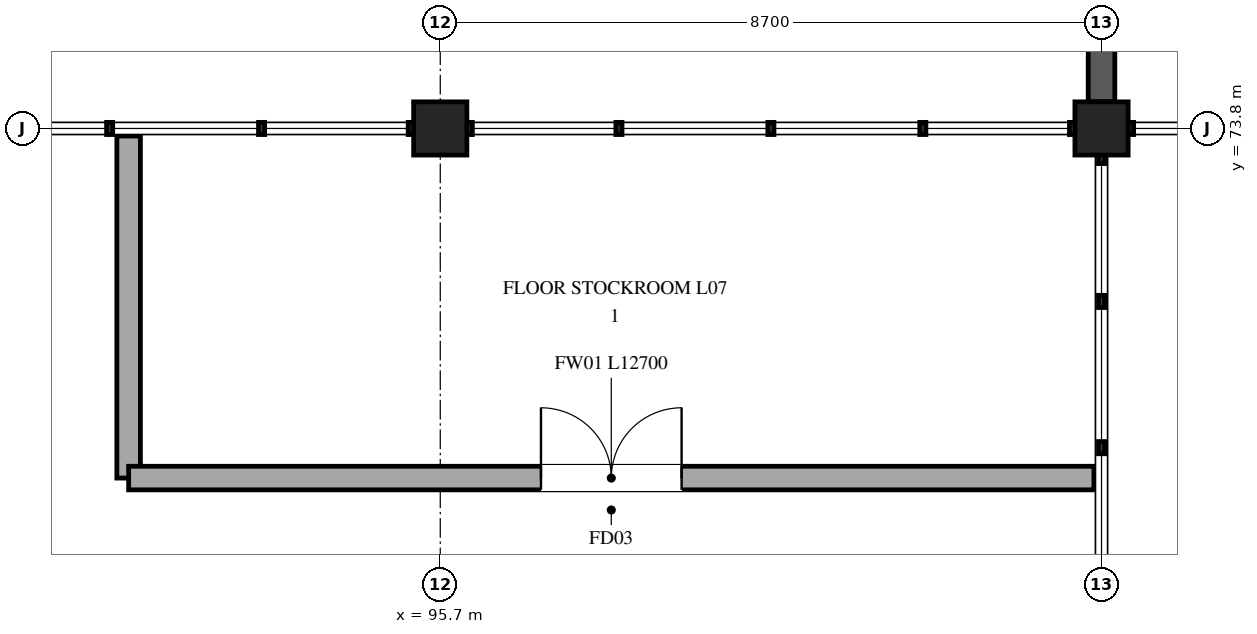
"""IFC4 building model, lengths in metres.
Left out: names, types, materials, properties, quantities, classifications, styles, units other than length and angle.
Written with IfcOpenShell. Run it as: python <this file> out.ifc"""

import sys

from ifc_helpers import new_model, si_unit, direction, frame, frame_2d, origin, origin_2d, place, context, subcontext, project, spatial, rectangle, extrude, element, fill, save


model = new_model("IFC4")
c1 = context("Model", 3, precision=1e-05, world=origin(), true_north=direction((0.0, 1.0)))
c2 = subcontext(c1, "Body", "Model", "MODEL_VIEW")
j1 = project(units=[si_unit("LENGTHUNIT", "METRE"), si_unit("PLANEANGLEUNIT", "RADIAN")], contexts=[c1])
p1 = place(None, origin())
s1 = spatial("IfcSite", under=j1, at=p1, CompositionType="ELEMENT")
p2 = place(p1, origin())
s2 = spatial("IfcBuilding", under=s1, at=p2, CompositionType="ELEMENT")
p3 = place(p2, frame((0.0, 0.0, 31.5)))
s3 = spatial("IfcBuildingStorey", under=s2, at=p3, CompositionType="ELEMENT", Elevation=31.5)
for number, where, z_axis, x_axis in (
    (1, (95.7, 73.8, 0.0), (0.0, 0.0, 1.0), (1.0, 0.0, 0.0)),
    (2, (104.4, 73.8, 0.0), (0.0, 0.0, 1.0), (1.0, 0.0, 0.0)),
):
    element("IfcColumn", number, at=place(p3, frame(where, z_axis=z_axis, x_axis=x_axis)), inside=s3, PredefinedType="COLUMN", context=c2, shape_type="SweptSolid", body=[
        extrude(rectangle(XDim=0.7, YDim=0.7, at=origin_2d()), origin(), (0.0, 0.0, 1.0), 4.8),
    ])
p4 = place(p3, frame((104.4, 74.152, 0.0), z_axis=(0.0, 0.0, 1.0), x_axis=(0.0, 1.0, 0.0)))
e3 = element("IfcWall", 3, at=p4, inside=s3, PredefinedType="STANDARD", context=c2, shape_type="SweptSolid", body=[
    extrude(rectangle(XDim=7.696, YDim=0.35, at=frame_2d((3.848, 0.0))), origin(), (0.0, 0.0, 1.0), 4.49),
])
p5 = place(p4, frame((2.248, 0.0, 0.85)))
e4 = element("IfcOpeningElement", 4, at=p5, cuts=e3, PredefinedType="OPENING", context=c2, shape_type="SweptSolid", body=[
    extrude(rectangle(XDim=3.2, YDim=2.55, at=frame_2d((1.6, 1.275))), frame((0.0, 0.185, 0.0), z_axis=(0.0, -1.0, 0.0), x_axis=(1.0, 0.0, 0.0)), (0.0, 0.0, 1.0), 0.37),
])
p6 = place(p3, frame((91.6, 73.7, 0.0), z_axis=(0.0, 0.0, 1.0), x_axis=(0.0, -1.0, 0.0)))
e5 = element("IfcWall", 5, at=p6, inside=s3, PredefinedType="STANDARD", context=c2, shape_type="SweptSolid", body=[
    extrude(rectangle(XDim=4.5, YDim=0.31, at=frame_2d((2.25, 0.0))), origin(), (0.0, 0.0, 1.0), 3.76),
])
p7 = place(p3, frame((91.6, 69.2, 0.0), z_axis=(0.0, 0.0, 1.0), x_axis=(1.0, 0.0, 0.0)))
e6 = element("IfcWall", 6, at=p7, inside=s3, PredefinedType="STANDARD", context=c2, shape_type="SweptSolid", body=[
    extrude(rectangle(XDim=12.7, YDim=0.31, at=frame_2d((6.35, 0.0))), origin(), (0.0, 0.0, 1.0), 3.76),
])
p8 = place(p7, frame((5.425, 0.0, 0.0)))
e7 = element("IfcOpeningElement", 7, at=p8, cuts=e6, PredefinedType="OPENING", context=c2, shape_type="SweptSolid", body=[
    extrude(rectangle(XDim=1.85, YDim=2.3, at=frame_2d((0.925, 1.15))), frame((0.0, 0.165, 0.0), z_axis=(0.0, -1.0, 0.0), x_axis=(1.0, 0.0, 0.0)), (0.0, 0.0, 1.0), 0.33),
])
p9 = place(p8, origin())
e8 = element("IfcDoor", 8, at=p9, inside=s3, OperationType="DOUBLE_DOOR_SINGLE_SWING", PredefinedType="DOOR", context=c2, shape_type="SweptSolid", body=[
    extrude(rectangle(XDim=1.85, YDim=2.3, at=frame_2d((0.925, 1.15))), frame((0.0, 0.025, 0.0), z_axis=(0.0, -1.0, 0.0), x_axis=(1.0, 0.0, 0.0)), (0.0, 0.0, 1.0), 0.05),
])
fill(e7, e8)
save(model, sys.argv[1])
